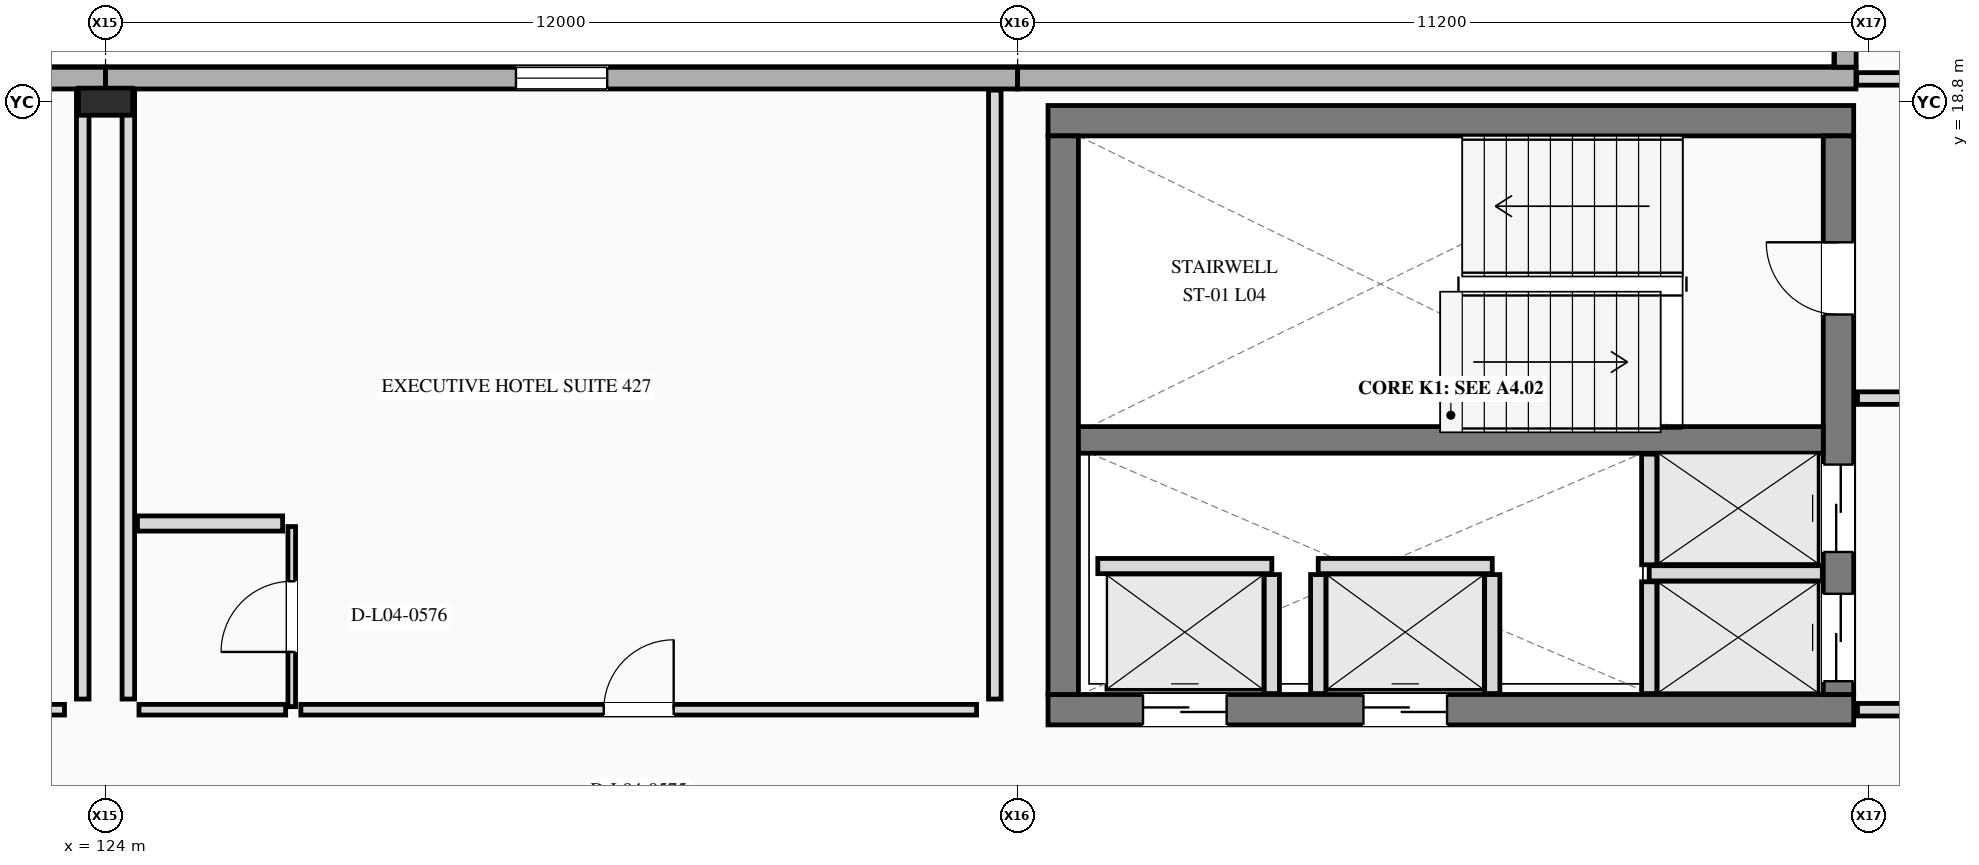
"""IFC4 building model, lengths in metres.
Left out: names, types, materials, properties, quantities, classifications, styles, units other than length and angle.
Written with IfcOpenShell. Run it as: python <this file> out.ifc"""

import sys

from ifc_helpers import new_model, si_unit, direction, frame, frame_2d, origin, origin_2d, place, context, subcontext, project, spatial, rectangle, i_section, extrude, element, fill, save


model = new_model("IFC4")
c1 = context("Model", 3, precision=1e-05, world=origin(), true_north=direction((0.0, 1.0)))
c2 = subcontext(c1, "Body", "Model", "MODEL_VIEW")
j1 = project(units=[si_unit("LENGTHUNIT", "METRE"), si_unit("PLANEANGLEUNIT", "RADIAN")], contexts=[c1])
p1 = place(None, origin())
s1 = spatial("IfcSite", under=j1, at=p1, CompositionType="ELEMENT")
p2 = place(p1, origin())
s2 = spatial("IfcBuilding", under=s1, at=p2, CompositionType="ELEMENT")
p3 = place(p2, frame((0.0, 0.0, 19.5)))
s3 = spatial("IfcBuildingStorey", under=s2, at=p3, CompositionType="ELEMENT", Elevation=19.5)
p4 = place(p3, frame((124.0, 18.8, 0.0), z_axis=(0.0, 0.0, 1.0), x_axis=(0.0, 1.0, 0.0)))
e1 = element("IfcColumn", 1, at=p4, inside=s3, PredefinedType="COLUMN", context=c2, shape_type="SweptSolid", body=[
    extrude(i_section(OverallWidth=0.356, OverallDepth=0.714, WebThickness=0.019, FlangeThickness=0.034, at=origin_2d()), origin(), (0.0, 0.0, 1.0), 3.9),
])
p5 = place(p3, frame((124.0, 19.11, 0.0), z_axis=(0.0, 0.0, 1.0), x_axis=(-1.0, 0.0, 0.0)))
e2 = element("IfcWall", 2, at=p5, inside=s3, PredefinedType="STANDARD", context=c2, shape_type="SweptSolid", body=[
    extrude(rectangle(XDim=12.0, YDim=0.285, at=frame_2d((6.0, 0.0))), origin(), (0.0, 0.0, 1.0), 3.9),
])
p6 = place(p5, frame((8.15, 0.0, 0.85)))
e3 = element("IfcOpeningElement", 3, at=p6, cuts=e2, PredefinedType="OPENING", context=c2, shape_type="SweptSolid", body=[
    extrude(rectangle(XDim=1.4, YDim=1.55, at=frame_2d((0.7, 0.775))), frame((0.0, 0.152, 0.0), z_axis=(0.0, -1.0, 0.0), x_axis=(1.0, 0.0, 0.0)), (0.0, 0.0, 1.0), 0.305),
])
p7 = place(p5, frame((2.475, 0.0, 0.85)))
e4 = element("IfcOpeningElement", 4, at=p7, cuts=e2, PredefinedType="OPENING", context=c2, shape_type="SweptSolid", body=[
    extrude(rectangle(XDim=1.35, YDim=1.65, at=frame_2d((0.675, 0.825))), frame((0.0, 0.152, 0.0), z_axis=(0.0, -1.0, 0.0), x_axis=(1.0, 0.0, 0.0)), (0.0, 0.0, 1.0), 0.305),
])
p8 = place(p3, frame((136.0, 19.11, 0.0), z_axis=(0.0, 0.0, 1.0), x_axis=(-1.0, 0.0, 0.0)))
e5 = element("IfcWall", 5, at=p8, inside=s3, PredefinedType="STANDARD", context=c2, shape_type="SweptSolid", body=[
    extrude(rectangle(XDim=12.0, YDim=0.285, at=frame_2d((6.0, 0.0))), origin(), (0.0, 0.0, 1.0), 3.9),
])
p9 = place(p8, frame((5.4, 0.0, 0.85)))
e6 = element("IfcOpeningElement", 6, at=p9, cuts=e5, PredefinedType="OPENING", context=c2, shape_type="SweptSolid", body=[
    extrude(rectangle(XDim=1.2, YDim=1.6, at=frame_2d((0.6, 0.8))), frame((0.0, 0.152, 0.0), z_axis=(0.0, -1.0, 0.0), x_axis=(1.0, 0.0, 0.0)), (0.0, 0.0, 1.0), 0.305),
])
p10 = place(p3, frame((147.03, 19.11, 0.0), z_axis=(0.0, 0.0, 1.0), x_axis=(-1.0, 0.0, 0.0)))
e7 = element("IfcWall", 7, at=p10, inside=s3, PredefinedType="STANDARD", context=c2, shape_type="SweptSolid", body=[
    extrude(rectangle(XDim=11.03, YDim=0.285, at=frame_2d((5.515, 0.0))), origin(), (0.0, 0.0, 1.0), 3.9),
])
p11 = place(p3, frame((146.89, 19.254, 0.0), z_axis=(0.0, 0.0, 1.0), x_axis=(0.0, 1.0, 0.0)))
e8 = element("IfcWall", 8, at=p11, inside=s3, PredefinedType="STANDARD", context=c2, shape_type="SweptSolid", body=[
    extrude(rectangle(XDim=5.546, YDim=0.285, at=frame_2d((2.773, 0.0))), origin(), (0.0, 0.0, 1.0), 3.9),
])
p12 = place(p11, frame((2.048, 0.0, 0.85)))
e9 = element("IfcOpeningElement", 9, at=p12, cuts=e8, PredefinedType="OPENING", context=c2, shape_type="SweptSolid", body=[
    extrude(rectangle(XDim=1.1, YDim=1.5, at=frame_2d((0.55, 0.75))), frame((0.0, 0.152, 0.0), z_axis=(0.0, -1.0, 0.0), x_axis=(1.0, 0.0, 0.0)), (0.0, 0.0, 1.0), 0.305),
])
p13 = place(p3, frame((136.4, 10.8, 0.0), z_axis=(0.0, 0.0, 1.0), x_axis=(1.0, 0.0, 0.0)))
e10 = element("IfcWall", 10, at=p13, inside=s3, PredefinedType="SHEAR", context=c2, shape_type="SweptSolid", body=[
    extrude(rectangle(XDim=10.6, YDim=0.4, at=frame_2d((5.3, 0.0))), origin(), (0.0, 0.0, 1.0), 3.9),
])
p14 = place(p13, frame((1.25, 0.0, 0.0)))
e11 = element("IfcOpeningElement", 11, at=p14, cuts=e10, PredefinedType="OPENING", context=c2, shape_type="SweptSolid", body=[
    extrude(rectangle(XDim=1.1, YDim=2.2, at=frame_2d((0.55, 1.1))), frame((0.0, 0.21, 0.0), z_axis=(0.0, -1.0, 0.0), x_axis=(1.0, 0.0, 0.0)), (0.0, 0.0, 1.0), 0.42),
])
p15 = place(p13, frame((4.15, 0.0, 0.0)))
e12 = element("IfcOpeningElement", 12, at=p15, cuts=e10, PredefinedType="OPENING", context=c2, shape_type="SweptSolid", body=[
    extrude(rectangle(XDim=1.1, YDim=2.2, at=frame_2d((0.55, 1.1))), frame((0.0, 0.21, 0.0), z_axis=(0.0, -1.0, 0.0), x_axis=(1.0, 0.0, 0.0)), (0.0, 0.0, 1.0), 0.42),
])
p16 = place(p3, frame((147.0, 18.55, 0.0), z_axis=(0.0, 0.0, 1.0), x_axis=(-1.0, 0.0, 0.0)))
e13 = element("IfcWall", 13, at=p16, inside=s3, PredefinedType="SHEAR", context=c2, shape_type="SweptSolid", body=[
    extrude(rectangle(XDim=10.6, YDim=0.4, at=frame_2d((5.3, 0.0))), origin(), (0.0, 0.0, 1.0), 3.9),
])
p17 = place(p3, frame((136.6, 18.35, 0.0), z_axis=(0.0, 0.0, 1.0), x_axis=(0.0, -1.0, 0.0)))
e14 = element("IfcWall", 14, at=p17, inside=s3, PredefinedType="SHEAR", context=c2, shape_type="SweptSolid", body=[
    extrude(rectangle(XDim=7.35, YDim=0.4, at=frame_2d((3.675, 0.0))), origin(), (0.0, 0.0, 1.0), 3.9),
])
p18 = place(p3, frame((146.8, 11.0, 0.0), z_axis=(0.0, 0.0, 1.0), x_axis=(0.0, 1.0, 0.0)))
e15 = element("IfcWall", 15, at=p18, inside=s3, PredefinedType="SHEAR", context=c2, shape_type="SweptSolid", body=[
    extrude(rectangle(XDim=7.35, YDim=0.4, at=frame_2d((3.675, 0.0))), origin(), (0.0, 0.0, 1.0), 3.9),
])
p19 = place(p18, frame((5.0, 0.0, 0.0)))
e16 = element("IfcOpeningElement", 16, at=p19, cuts=e15, PredefinedType="OPENING", context=c2, shape_type="SweptSolid", body=[
    extrude(rectangle(XDim=0.95, YDim=2.2, at=frame_2d((0.475, 1.1))), frame((0.0, 0.21, 0.0), z_axis=(0.0, -1.0, 0.0), x_axis=(1.0, 0.0, 0.0)), (0.0, 0.0, 1.0), 0.42),
])
p20 = place(p18, frame((0.175, 0.0, 0.0)))
e17 = element("IfcOpeningElement", 17, at=p20, cuts=e15, PredefinedType="OPENING", context=c2, shape_type="SweptSolid", body=[
    extrude(rectangle(XDim=1.15, YDim=2.25, at=frame_2d((0.575, 1.125))), frame((0.0, 0.21, 0.0), z_axis=(0.0, -1.0, 0.0), x_axis=(1.0, 0.0, 0.0)), (0.0, 0.0, 1.0), 0.42),
])
p21 = place(p18, frame((1.875, 0.0, 0.0)))
e18 = element("IfcOpeningElement", 18, at=p21, cuts=e15, PredefinedType="OPENING", context=c2, shape_type="SweptSolid", body=[
    extrude(rectangle(XDim=1.15, YDim=2.25, at=frame_2d((0.575, 1.125))), frame((0.0, 0.21, 0.0), z_axis=(0.0, -1.0, 0.0), x_axis=(1.0, 0.0, 0.0)), (0.0, 0.0, 1.0), 0.42),
])
p22 = place(p3, frame((136.8, 14.35, 0.0), z_axis=(0.0, 0.0, 1.0), x_axis=(1.0, 0.0, 0.0)))
e19 = element("IfcWall", 19, at=p22, inside=s3, PredefinedType="SHEAR", context=c2, shape_type="SweptSolid", body=[
    extrude(rectangle(XDim=9.8, YDim=0.35, at=frame_2d((4.9, 0.0))), origin(), (0.0, 0.0, 1.0), 3.9),
])
p23 = place(p3, frame((137.055, 12.69, 0.0), z_axis=(0.0, 0.0, 1.0), x_axis=(1.0, 0.0, 0.0)))
e20 = element("IfcWall", 20, at=p23, inside=s3, PredefinedType="PLUMBINGWALL", context=c2, shape_type="SweptSolid", body=[
    extrude(rectangle(XDim=2.29, YDim=0.2, at=frame_2d((1.145, 0.0))), origin(), (0.0, 0.0, 1.0), 3.585),
])
p24 = place(p3, frame((139.345, 11.012, 0.0), z_axis=(0.0, 0.0, 1.0), x_axis=(0.0, 1.0, 0.0)))
e21 = element("IfcWall", 21, at=p24, inside=s3, PredefinedType="PLUMBINGWALL", context=c2, shape_type="SweptSolid", body=[
    extrude(rectangle(XDim=1.566, YDim=0.2, at=frame_2d((0.783, 0.0))), origin(), (0.0, 0.0, 1.0), 3.585),
])
p25 = place(p3, frame((139.955, 12.69, 0.0), z_axis=(0.0, 0.0, 1.0), x_axis=(1.0, 0.0, 0.0)))
e22 = element("IfcWall", 22, at=p25, inside=s3, PredefinedType="PLUMBINGWALL", context=c2, shape_type="SweptSolid", body=[
    extrude(rectangle(XDim=2.29, YDim=0.2, at=frame_2d((1.145, 0.0))), origin(), (0.0, 0.0, 1.0), 3.585),
])
for number, where, z_axis, x_axis in (
    (23, (139.955, 11.012, 0.0), (0.0, 0.0, 1.0), (0.0, 1.0, 0.0)),
    (24, (142.245, 11.012, 0.0), (0.0, 0.0, 1.0), (0.0, 1.0, 0.0)),
):
    element("IfcWall", number, at=place(p3, frame(where, z_axis=z_axis, x_axis=x_axis)), inside=s3, PredefinedType="PLUMBINGWALL", context=c2, shape_type="SweptSolid", body=[
        extrude(rectangle(XDim=1.566, YDim=0.2, at=frame_2d((0.783, 0.0))), origin(), (0.0, 0.0, 1.0), 3.585),
    ])
p26 = place(p3, frame((144.31, 12.595, 0.0), z_axis=(0.0, 0.0, 1.0), x_axis=(1.0, 0.0, 0.0)))
e25 = element("IfcWall", 25, at=p26, inside=s3, PredefinedType="PLUMBINGWALL", context=c2, shape_type="SweptSolid", body=[
    extrude(rectangle(XDim=2.278, YDim=0.2, at=frame_2d((1.139, 0.0))), origin(), (0.0, 0.0, 1.0), 3.585),
])
p27 = place(p3, frame((144.31, 11.012, 0.0), z_axis=(0.0, 0.0, 1.0), x_axis=(0.0, 1.0, 0.0)))
e26 = element("IfcWall", 26, at=p27, inside=s3, PredefinedType="PLUMBINGWALL", context=c2, shape_type="SweptSolid", body=[
    extrude(rectangle(XDim=1.471, YDim=0.2, at=frame_2d((0.735, 0.0))), origin(), (0.0, 0.0, 1.0), 3.585),
])
p28 = place(p3, frame((144.31, 12.707, 0.0), z_axis=(0.0, 0.0, 1.0), x_axis=(0.0, 1.0, 0.0)))
e27 = element("IfcWall", 27, at=p28, inside=s3, PredefinedType="PLUMBINGWALL", context=c2, shape_type="SweptSolid", body=[
    extrude(rectangle(XDim=1.456, YDim=0.2, at=frame_2d((0.728, 0.0))), origin(), (0.0, 0.0, 1.0), 3.585),
])
p29 = place(p3, frame((147.05, 10.8, 0.0), z_axis=(0.0, 0.0, 1.0), x_axis=(1.0, 0.0, 0.0)))
e28 = element("IfcWall", 28, at=p29, inside=s3, PredefinedType="PARTITIONING", context=c2, shape_type="SweptSolid", body=[
    extrude(rectangle(XDim=4.55, YDim=0.165, at=frame_2d((2.275, 0.0))), origin(), (0.0, 0.0, 1.0), 3.585),
])
p30 = place(p29, frame((1.725, 0.0, 0.0)))
e29 = element("IfcOpeningElement", 29, at=p30, cuts=e28, PredefinedType="OPENING", context=c2, shape_type="SweptSolid", body=[
    extrude(rectangle(XDim=1.1, YDim=2.2, at=frame_2d((0.55, 1.1))), frame((0.0, 0.093, 0.0), z_axis=(0.0, -1.0, 0.0), x_axis=(1.0, 0.0, 0.0)), (0.0, 0.0, 1.0), 0.185),
])
p31 = place(p3, frame((147.05, 14.9, 0.0), z_axis=(0.0, 0.0, 1.0), x_axis=(1.0, 0.0, 0.0)))
e30 = element("IfcWall", 30, at=p31, inside=s3, PredefinedType="PARTITIONING", context=c2, shape_type="SweptSolid", body=[
    extrude(rectangle(XDim=4.55, YDim=0.165, at=frame_2d((2.275, 0.0))), origin(), (0.0, 0.0, 1.0), 3.585),
])
p32 = place(p31, frame((1.8, 0.0, 0.0)))
e31 = element("IfcOpeningElement", 31, at=p32, cuts=e30, PredefinedType="OPENING", context=c2, shape_type="SweptSolid", body=[
    extrude(rectangle(XDim=0.95, YDim=2.2, at=frame_2d((0.475, 1.1))), frame((0.0, 0.093, 0.0), z_axis=(0.0, -1.0, 0.0), x_axis=(1.0, 0.0, 0.0)), (0.0, 0.0, 1.0), 0.185),
])
p33 = place(p3, frame((120.27, 10.8, 0.0), z_axis=(0.0, 0.0, 1.0), x_axis=(1.0, 0.0, 0.0)))
e32 = element("IfcWall", 32, at=p33, inside=s3, PredefinedType="PARTITIONING", context=c2, shape_type="SweptSolid", body=[
    extrude(rectangle(XDim=3.19, YDim=0.14, at=frame_2d((1.595, 0.0))), origin(), (0.0, 0.0, 1.0), 3.585),
])
p34 = place(p33, frame((1.075, 0.0, 0.0)))
e33 = element("IfcOpeningElement", 33, at=p34, cuts=e32, PredefinedType="OPENING", context=c2, shape_type="SweptSolid", body=[
    extrude(rectangle(XDim=1.04, YDim=2.25, at=frame_2d((0.52, 1.125))), frame((0.0, 0.08, 0.0), z_axis=(0.0, -1.0, 0.0), x_axis=(1.0, 0.0, 0.0)), (0.0, 0.0, 1.0), 0.16),
])
p35 = place(p3, frame((123.7, 10.94, 0.0), z_axis=(0.0, 0.0, 1.0), x_axis=(0.0, 1.0, 0.0)))
e34 = element("IfcWall", 34, at=p35, inside=s3, PredefinedType="PARTITIONING", context=c2, shape_type="SweptSolid", body=[
    extrude(rectangle(XDim=8.012, YDim=0.165, at=frame_2d((4.006, 0.0))), origin(), (0.0, 0.0, 1.0), 2.823),
])
p36 = place(p3, frame((124.44, 10.8, 0.0), z_axis=(0.0, 0.0, 1.0), x_axis=(1.0, 0.0, 0.0)))
e35 = element("IfcWall", 35, at=p36, inside=s3, PredefinedType="PARTITIONING", context=c2, shape_type="SweptSolid", body=[
    extrude(rectangle(XDim=1.93, YDim=0.14, at=frame_2d((0.965, 0.0))), origin(), (0.0, 0.0, 1.0), 3.585),
])
p37 = place(p3, frame((126.57, 10.8, 0.0), z_axis=(0.0, 0.0, 1.0), x_axis=(1.0, 0.0, 0.0)))
e36 = element("IfcWall", 36, at=p37, inside=s3, PredefinedType="PARTITIONING", context=c2, shape_type="SweptSolid", body=[
    extrude(rectangle(XDim=8.89, YDim=0.14, at=frame_2d((4.445, 0.0))), origin(), (0.0, 0.0, 1.0), 3.585),
])
p38 = place(p37, frame((3.985, 0.0, 0.0)))
e37 = element("IfcOpeningElement", 37, at=p38, cuts=e36, PredefinedType="OPENING", context=c2, shape_type="SweptSolid", body=[
    extrude(rectangle(XDim=0.92, YDim=2.3, at=frame_2d((0.46, 1.15))), frame((0.0, 0.08, 0.0), z_axis=(0.0, -1.0, 0.0), x_axis=(1.0, 0.0, 0.0)), (0.0, 0.0, 1.0), 0.16),
])
p39 = place(p3, frame((124.3, 10.94, 0.0), z_axis=(0.0, 0.0, 1.0), x_axis=(0.0, 1.0, 0.0)))
e38 = element("IfcWall", 38, at=p39, inside=s3, PredefinedType="PARTITIONING", context=c2, shape_type="SweptSolid", body=[
    extrude(rectangle(XDim=8.012, YDim=0.165, at=frame_2d((4.006, 0.0))), origin(), (0.0, 0.0, 1.0), 2.914),
])
p40 = place(p3, frame((135.7, 10.94, 0.0), z_axis=(0.0, 0.0, 1.0), x_axis=(0.0, 1.0, 0.0)))
e39 = element("IfcWall", 39, at=p40, inside=s3, PredefinedType="PARTITIONING", context=c2, shape_type="SweptSolid", body=[
    extrude(rectangle(XDim=8.012, YDim=0.165, at=frame_2d((4.006, 0.0))), origin(), (0.0, 0.0, 1.0), 3.585),
])
p41 = place(p3, frame((126.45, 10.84, 0.0), z_axis=(0.0, 0.0, 1.0), x_axis=(0.0, 1.0, 0.0)))
e40 = element("IfcWall", 40, at=p41, inside=s3, PredefinedType="PARTITIONING", context=c2, shape_type="SweptSolid", body=[
    extrude(rectangle(XDim=2.37, YDim=0.1, at=frame_2d((1.185, 0.0))), origin(), (0.0, 0.0, 1.0), 3.585),
])
p42 = place(p41, frame((0.72, 0.0, 0.0)))
e41 = element("IfcOpeningElement", 41, at=p42, cuts=e40, PredefinedType="OPENING", context=c2, shape_type="SweptSolid", body=[
    extrude(rectangle(XDim=0.93, YDim=2.22, at=frame_2d((0.465, 1.11))), frame((0.0, 0.06, 0.0), z_axis=(0.0, -1.0, 0.0), x_axis=(1.0, 0.0, 0.0)), (0.0, 0.0, 1.0), 0.12),
])
p43 = place(p3, frame((124.42, 13.25, 0.0), z_axis=(0.0, 0.0, 1.0), x_axis=(1.0, 0.0, 0.0)))
e42 = element("IfcWall", 42, at=p43, inside=s3, PredefinedType="PLUMBINGWALL", context=c2, shape_type="SweptSolid", body=[
    extrude(rectangle(XDim=1.91, YDim=0.2, at=frame_2d((0.955, 0.0))), origin(), (0.0, 0.0, 1.0), 3.585),
])
p44 = place(p3, frame((147.04, 19.1, 0.0), z_axis=(0.0, 0.0, 1.0), x_axis=(1.0, 0.0, 0.0)))
e43 = element("IfcWall", 43, at=p44, inside=s3, PredefinedType="PARTITIONING", context=c2, shape_type="SweptSolid", body=[
    extrude(rectangle(XDim=8.22, YDim=0.165, at=frame_2d((4.11, 0.0))), origin(), (0.0, 0.0, 1.0), 3.585),
])
p45 = place(p9, origin())
e44 = element("IfcWindow", 44, at=p45, inside=s3, PartitioningType="SINGLE_PANEL", PredefinedType="WINDOW", context=c2, shape_type="SweptSolid", body=[
    extrude(rectangle(XDim=1.2, YDim=1.6, at=frame_2d((0.6, 0.8))), frame((0.0, 0.03, 0.0), z_axis=(0.0, -1.0, 0.0), x_axis=(1.0, 0.0, 0.0)), (0.0, 0.0, 1.0), 0.06),
])
fill(e6, e44)
p46 = place(p19, origin())
e45 = element("IfcDoor", 45, at=p46, inside=s3, OperationType="SINGLE_SWING_RIGHT", PredefinedType="DOOR", context=c2, shape_type="SweptSolid", body=[
    extrude(rectangle(XDim=0.95, YDim=2.2, at=frame_2d((0.475, 1.1))), frame((0.0, 0.025, 0.0), z_axis=(0.0, -1.0, 0.0), x_axis=(1.0, 0.0, 0.0)), (0.0, 0.0, 1.0), 0.05),
])
fill(e16, e45)
p47 = place(p14, origin())
e46 = element("IfcDoor", 46, at=p47, inside=s3, OperationType="SLIDING_TO_LEFT", PredefinedType="DOOR", context=c2, shape_type="SweptSolid", body=[
    extrude(rectangle(XDim=1.1, YDim=2.2, at=frame_2d((0.55, 1.1))), frame((0.0, 0.025, 0.0), z_axis=(0.0, -1.0, 0.0), x_axis=(1.0, 0.0, 0.0)), (0.0, 0.0, 1.0), 0.05),
])
fill(e11, e46)
p48 = place(p15, origin())
e47 = element("IfcDoor", 47, at=p48, inside=s3, OperationType="SLIDING_TO_RIGHT", PredefinedType="DOOR", context=c2, shape_type="SweptSolid", body=[
    extrude(rectangle(XDim=1.1, YDim=2.2, at=frame_2d((0.55, 1.1))), frame((0.0, 0.025, 0.0), z_axis=(0.0, -1.0, 0.0), x_axis=(1.0, 0.0, 0.0)), (0.0, 0.0, 1.0), 0.05),
])
fill(e12, e47)
p49 = place(p20, origin())
e48 = element("IfcDoor", 48, at=p49, inside=s3, OperationType="SLIDING_TO_LEFT", PredefinedType="DOOR", context=c2, shape_type="SweptSolid", body=[
    extrude(rectangle(XDim=1.15, YDim=2.25, at=frame_2d((0.575, 1.125))), frame((0.0, 0.025, 0.0), z_axis=(0.0, -1.0, 0.0), x_axis=(1.0, 0.0, 0.0)), (0.0, 0.0, 1.0), 0.05),
])
fill(e17, e48)
p50 = place(p21, origin())
e49 = element("IfcDoor", 49, at=p50, inside=s3, OperationType="SLIDING_TO_RIGHT", PredefinedType="DOOR", context=c2, shape_type="SweptSolid", body=[
    extrude(rectangle(XDim=1.15, YDim=2.25, at=frame_2d((0.575, 1.125))), frame((0.0, 0.025, 0.0), z_axis=(0.0, -1.0, 0.0), x_axis=(1.0, 0.0, 0.0)), (0.0, 0.0, 1.0), 0.05),
])
fill(e18, e49)
p51 = place(p38, origin())
e50 = element("IfcDoor", 50, at=p51, inside=s3, OperationType="SINGLE_SWING_RIGHT", PredefinedType="DOOR", context=c2, shape_type="SweptSolid", body=[
    extrude(rectangle(XDim=0.92, YDim=2.3, at=frame_2d((0.46, 1.15))), frame((0.0, 0.025, 0.0), z_axis=(0.0, -1.0, 0.0), x_axis=(1.0, 0.0, 0.0)), (0.0, 0.0, 1.0), 0.05),
])
fill(e37, e50)
p52 = place(p42, origin())
e51 = element("IfcDoor", 51, at=p52, inside=s3, OperationType="SINGLE_SWING_LEFT", PredefinedType="DOOR", context=c2, shape_type="SweptSolid", body=[
    extrude(rectangle(XDim=0.93, YDim=2.22, at=frame_2d((0.465, 1.11))), frame((0.0, 0.025, 0.0), z_axis=(0.0, -1.0, 0.0), x_axis=(1.0, 0.0, 0.0)), (0.0, 0.0, 1.0), 0.05),
])
fill(e41, e51)
save(model, sys.argv[1])
